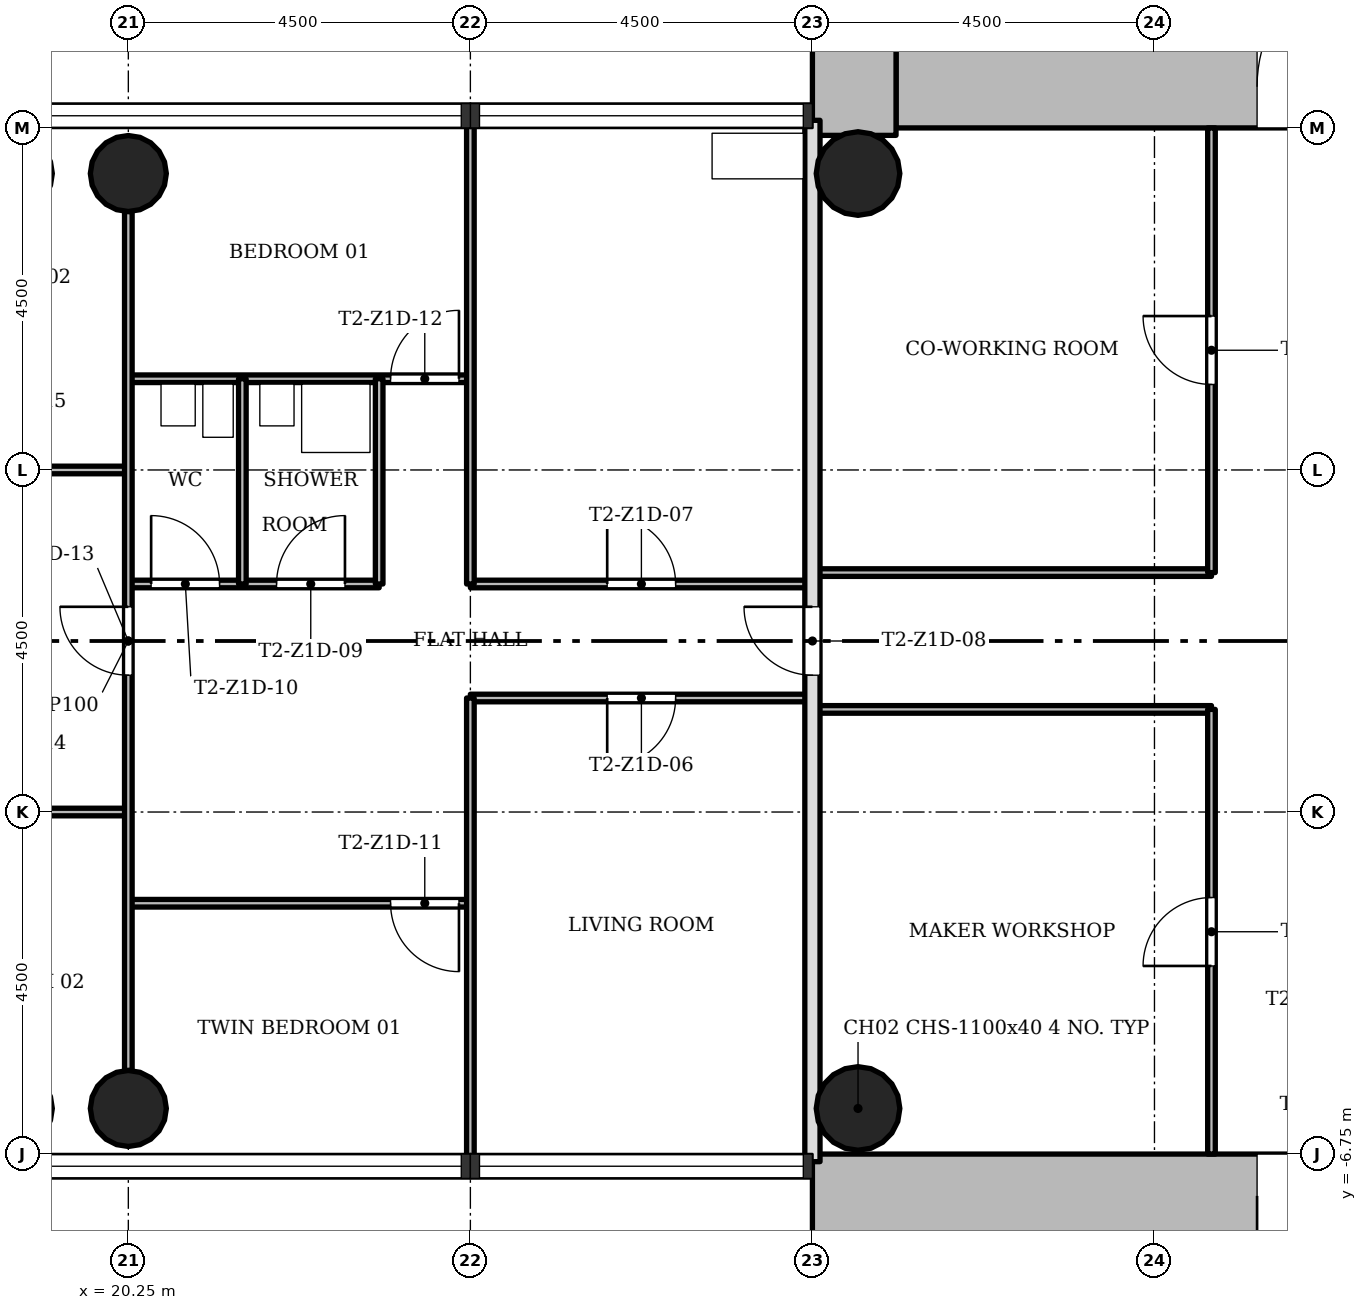
"""IFC4 building model, lengths in metres.
Left out: names, types, materials, properties, quantities, classifications, styles, units other than length and angle.
Written with IfcOpenShell. Run it as: python <this file> out.ifc"""

import sys

from ifc_helpers import new_model, si_unit, direction, frame, frame_2d, origin, origin_2d, place, context, subcontext, project, spatial, rectangle, hollow_circle, extrude, element, fill, save


model = new_model("IFC4")
c1 = context("Model", 3, precision=1e-05, world=origin(), true_north=direction((0.0, 1.0)))
c2 = subcontext(c1, "Body", "Model", "MODEL_VIEW")
j1 = project(units=[si_unit("LENGTHUNIT", "METRE"), si_unit("PLANEANGLEUNIT", "RADIAN")], contexts=[c1])
p1 = place(None, origin())
s1 = spatial("IfcSite", under=j1, at=p1, CompositionType="ELEMENT")
p2 = place(p1, origin())
s2 = spatial("IfcBuilding", under=s1, at=p2, CompositionType="ELEMENT")
p3 = place(p2, frame((0.0, 0.0, 61.9)))
s3 = spatial("IfcBuildingStorey", under=s2, at=p3, CompositionType="ELEMENT", Elevation=61.9)
p4 = place(p3, frame((30.35, 7.3, 0.0), z_axis=(0.0, 0.0, 1.0), x_axis=(1.0, 0.0, 0.0)))
e1 = element("IfcWall", 1, at=p4, inside=s3, PredefinedType="SHEAR", context=c2, shape_type="SweptSolid", body=[
    extrude(rectangle(XDim=12.4, YDim=1.1, at=frame_2d((6.2, 0.0))), origin(), (0.0, 0.0, 1.0), 3.4),
])
p5 = place(p4, frame((4.75, 0.0, 0.0)))
e2 = element("IfcOpeningElement", 2, at=p5, cuts=e1, PredefinedType="OPENING", context=c2, shape_type="SweptSolid", body=[
    extrude(rectangle(XDim=1.8, YDim=2.1, at=frame_2d((0.9, 1.05))), frame((0.0, 0.56, 0.0), z_axis=(0.0, -1.0, 0.0), x_axis=(1.0, 0.0, 0.0)), (0.0, 0.0, 1.0), 1.12),
])
p6 = place(p3, frame((29.8, 15.248, 0.0), z_axis=(0.0, 0.0, 1.0), x_axis=(0.0, -1.0, 0.0)))
e3 = element("IfcWall", 3, at=p6, inside=s3, PredefinedType="SHEAR", context=c2, shape_type="SweptSolid", body=[
    extrude(rectangle(XDim=8.596, YDim=1.1, at=frame_2d((4.298, 0.0))), origin(), (0.0, 0.0, 1.0), 3.4),
])
p7 = place(p3, frame((41.65, -7.3, 0.0), z_axis=(0.0, 0.0, 1.0), x_axis=(-1.0, 0.0, 0.0)))
e4 = element("IfcWall", 4, at=p7, inside=s3, PredefinedType="SHEAR", context=c2, shape_type="SweptSolid", body=[
    extrude(rectangle(XDim=12.4, YDim=1.1, at=frame_2d((6.2, 0.0))), origin(), (0.0, 0.0, 1.0), 3.4),
])
p8 = place(p7, frame((4.75, 0.0, 0.0)))
e5 = element("IfcOpeningElement", 5, at=p8, cuts=e4, PredefinedType="OPENING", context=c2, shape_type="SweptSolid", body=[
    extrude(rectangle(XDim=1.8, YDim=2.1, at=frame_2d((0.9, 1.05))), frame((0.0, 0.56, 0.0), z_axis=(0.0, -1.0, 0.0), x_axis=(1.0, 0.0, 0.0)), (0.0, 0.0, 1.0), 1.12),
])
for number, where, z_axis, x_axis in (
    (6, (20.25, 6.15, 0.0), (0.0, 0.0, 1.0), (1.0, 0.0, 0.0)),
    (7, (20.25, -6.15, 0.0), (0.0, 0.0, 1.0), (1.0, 0.0, 0.0)),
):
    element("IfcColumn", number, at=place(p3, frame(where, z_axis=z_axis, x_axis=x_axis)), inside=s3, PredefinedType="COLUMN", context=c2, shape_type="SweptSolid", body=[
        extrude(hollow_circle(Radius=0.5, WallThickness=0.036, at=origin_2d()), origin(), (0.0, 0.0, 1.0), 3.4),
    ])
for number, where, z_axis, x_axis in (
    (8, (29.85, 6.15, 0.0), (0.0, 0.0, 1.0), (1.0, 0.0, 0.0)),
    (9, (29.85, -6.15, 0.0), (0.0, 0.0, 1.0), (1.0, 0.0, 0.0)),
):
    element("IfcColumn", number, at=place(p3, frame(where, z_axis=z_axis, x_axis=x_axis)), inside=s3, PredefinedType="COLUMN", context=c2, shape_type="SweptSolid", body=[
        extrude(hollow_circle(Radius=0.55, WallThickness=0.04, at=origin_2d()), origin(), (0.0, 0.0, 1.0), 3.4),
    ])
p9 = place(p3, frame((24.75, -3.45, 0.0), z_axis=(0.0, 0.0, 1.0), x_axis=(-1.0, 0.0, 0.0)))
e10 = element("IfcWall", 10, at=p9, inside=s3, PredefinedType="PARTITIONING", context=c2, shape_type="SweptSolid", body=[
    extrude(rectangle(XDim=4.5, YDim=0.1, at=frame_2d((2.25, 0.0))), origin(), (0.0, 0.0, 1.0), 3.0),
])
p10 = place(p9, frame((0.15, 0.0, 0.0)))
e11 = element("IfcOpeningElement", 11, at=p10, cuts=e10, PredefinedType="OPENING", context=c2, shape_type="SweptSolid", body=[
    extrude(rectangle(XDim=0.9, YDim=2.1, at=frame_2d((0.45, 1.05))), frame((0.0, 0.06, 0.0), z_axis=(0.0, -1.0, 0.0), x_axis=(1.0, 0.0, 0.0)), (0.0, 0.0, 1.0), 0.12),
])
p11 = place(p3, frame((20.25, -2.25, 0.0), z_axis=(0.0, 0.0, 1.0), x_axis=(-1.0, 0.0, 0.0)))
e12 = element("IfcWall", 12, at=p11, inside=s3, PredefinedType="PARTITIONING", context=c2, shape_type="SweptSolid", body=[
    extrude(rectangle(XDim=4.6, YDim=0.1, at=frame_2d((2.3, 0.0))), origin(), (0.0, 0.0, 1.0), 3.0),
])
p12 = place(p11, frame((1.05, 0.0, 0.0)))
e13 = element("IfcOpeningElement", 13, at=p12, cuts=e12, PredefinedType="OPENING", context=c2, shape_type="SweptSolid", body=[
    extrude(rectangle(XDim=0.9, YDim=2.1, at=frame_2d((0.45, 1.05))), frame((0.0, 0.06, 0.0), z_axis=(0.0, -1.0, 0.0), x_axis=(1.0, 0.0, 0.0)), (0.0, 0.0, 1.0), 0.12),
])
p13 = place(p3, frame((34.5, -0.9, 0.0), z_axis=(0.0, 0.0, 1.0), x_axis=(-1.0, 0.0, 0.0)))
e14 = element("IfcWall", 14, at=p13, inside=s3, PredefinedType="PARTITIONING", context=c2, shape_type="SweptSolid", body=[
    extrude(rectangle(XDim=5.25, YDim=0.1, at=frame_2d((2.625, 0.0))), origin(), (0.0, 0.0, 1.0), 3.0),
])
p14 = place(p3, frame((29.25, -0.75, 0.0), z_axis=(0.0, 0.0, 1.0), x_axis=(-1.0, 0.0, 0.0)))
e15 = element("IfcWall", 15, at=p14, inside=s3, PredefinedType="PARTITIONING", context=c2, shape_type="SweptSolid", body=[
    extrude(rectangle(XDim=4.5, YDim=0.1, at=frame_2d((2.25, 0.0))), origin(), (0.0, 0.0, 1.0), 3.0),
])
p15 = place(p14, frame((1.8, 0.0, 0.0)))
e16 = element("IfcOpeningElement", 16, at=p15, cuts=e15, PredefinedType="OPENING", context=c2, shape_type="SweptSolid", body=[
    extrude(rectangle(XDim=0.9, YDim=2.1, at=frame_2d((0.45, 1.05))), frame((0.0, 0.06, 0.0), z_axis=(0.0, -1.0, 0.0), x_axis=(1.0, 0.0, 0.0)), (0.0, 0.0, 1.0), 0.12),
])
p16 = place(p3, frame((29.25, 0.75, 0.0), z_axis=(0.0, 0.0, 1.0), x_axis=(-1.0, 0.0, 0.0)))
e17 = element("IfcWall", 17, at=p16, inside=s3, PredefinedType="PARTITIONING", context=c2, shape_type="SweptSolid", body=[
    extrude(rectangle(XDim=4.5, YDim=0.1, at=frame_2d((2.25, 0.0))), origin(), (0.0, 0.0, 1.0), 3.0),
])
p17 = place(p16, frame((1.8, 0.0, 0.0)))
e18 = element("IfcOpeningElement", 18, at=p17, cuts=e17, PredefinedType="OPENING", context=c2, shape_type="SweptSolid", body=[
    extrude(rectangle(XDim=0.9, YDim=2.1, at=frame_2d((0.45, 1.05))), frame((0.0, 0.06, 0.0), z_axis=(0.0, -1.0, 0.0), x_axis=(1.0, 0.0, 0.0)), (0.0, 0.0, 1.0), 0.12),
])
p18 = place(p3, frame((23.55, 0.75, 0.0), z_axis=(0.0, 0.0, 1.0), x_axis=(-1.0, 0.0, 0.0)))
e19 = element("IfcWall", 19, at=p18, inside=s3, PredefinedType="PARTITIONING", context=c2, shape_type="SweptSolid", body=[
    extrude(rectangle(XDim=3.3, YDim=0.1, at=frame_2d((1.65, 0.0))), origin(), (0.0, 0.0, 1.0), 3.0),
])
p19 = place(p18, frame((0.45, 0.0, 0.0)))
e20 = element("IfcOpeningElement", 20, at=p19, cuts=e19, PredefinedType="OPENING", context=c2, shape_type="SweptSolid", body=[
    extrude(rectangle(XDim=0.9, YDim=2.1, at=frame_2d((0.45, 1.05))), frame((0.0, 0.06, 0.0), z_axis=(0.0, -1.0, 0.0), x_axis=(1.0, 0.0, 0.0)), (0.0, 0.0, 1.0), 0.12),
])
p20 = place(p18, frame((2.1, 0.0, 0.0)))
e21 = element("IfcOpeningElement", 21, at=p20, cuts=e19, PredefinedType="OPENING", context=c2, shape_type="SweptSolid", body=[
    extrude(rectangle(XDim=0.9, YDim=2.1, at=frame_2d((0.45, 1.05))), frame((0.0, 0.06, 0.0), z_axis=(0.0, -1.0, 0.0), x_axis=(1.0, 0.0, 0.0)), (0.0, 0.0, 1.0), 0.12),
])
p21 = place(p3, frame((34.5, 0.9, 0.0), z_axis=(0.0, 0.0, 1.0), x_axis=(-1.0, 0.0, 0.0)))
e22 = element("IfcWall", 22, at=p21, inside=s3, PredefinedType="PARTITIONING", context=c2, shape_type="SweptSolid", body=[
    extrude(rectangle(XDim=5.25, YDim=0.1, at=frame_2d((2.625, 0.0))), origin(), (0.0, 0.0, 1.0), 3.0),
])
p22 = place(p3, frame((20.25, 2.25, 0.0), z_axis=(0.0, 0.0, 1.0), x_axis=(-1.0, 0.0, 0.0)))
e23 = element("IfcWall", 23, at=p22, inside=s3, PredefinedType="PARTITIONING", context=c2, shape_type="SweptSolid", body=[
    extrude(rectangle(XDim=4.6, YDim=0.1, at=frame_2d((2.3, 0.0))), origin(), (0.0, 0.0, 1.0), 3.0),
])
p23 = place(p22, frame((1.05, 0.0, 0.0)))
e24 = element("IfcOpeningElement", 24, at=p23, cuts=e23, PredefinedType="OPENING", context=c2, shape_type="SweptSolid", body=[
    extrude(rectangle(XDim=0.9, YDim=2.1, at=frame_2d((0.45, 1.05))), frame((0.0, 0.06, 0.0), z_axis=(0.0, -1.0, 0.0), x_axis=(1.0, 0.0, 0.0)), (0.0, 0.0, 1.0), 0.12),
])
p24 = place(p3, frame((24.75, 3.45, 0.0), z_axis=(0.0, 0.0, 1.0), x_axis=(-1.0, 0.0, 0.0)))
e25 = element("IfcWall", 25, at=p24, inside=s3, PredefinedType="PARTITIONING", context=c2, shape_type="SweptSolid", body=[
    extrude(rectangle(XDim=4.5, YDim=0.1, at=frame_2d((2.25, 0.0))), origin(), (0.0, 0.0, 1.0), 3.0),
])
p25 = place(p24, frame((0.15, 0.0, 0.0)))
e26 = element("IfcOpeningElement", 26, at=p25, cuts=e25, PredefinedType="OPENING", context=c2, shape_type="SweptSolid", body=[
    extrude(rectangle(XDim=0.9, YDim=2.1, at=frame_2d((0.45, 1.05))), frame((0.0, 0.06, 0.0), z_axis=(0.0, -1.0, 0.0), x_axis=(1.0, 0.0, 0.0)), (0.0, 0.0, 1.0), 0.12),
])
p26 = place(p3, frame((34.5, -6.75, 0.0), z_axis=(0.0, 0.0, 1.0), x_axis=(0.0, 1.0, 0.0)))
e27 = element("IfcWall", 27, at=p26, inside=s3, PredefinedType="PARTITIONING", context=c2, shape_type="SweptSolid", body=[
    extrude(rectangle(XDim=5.85, YDim=0.1, at=frame_2d((2.925, 0.0))), origin(), (0.0, 0.0, 1.0), 3.0),
])
p27 = place(p26, frame((2.475, 0.0, 0.0)))
e28 = element("IfcOpeningElement", 28, at=p27, cuts=e27, PredefinedType="OPENING", context=c2, shape_type="SweptSolid", body=[
    extrude(rectangle(XDim=0.9, YDim=2.1, at=frame_2d((0.45, 1.05))), frame((0.0, 0.06, 0.0), z_axis=(0.0, -1.0, 0.0), x_axis=(1.0, 0.0, 0.0)), (0.0, 0.0, 1.0), 0.12),
])
p28 = place(p3, frame((34.5, 0.9, 0.0), z_axis=(0.0, 0.0, 1.0), x_axis=(0.0, 1.0, 0.0)))
e29 = element("IfcWall", 29, at=p28, inside=s3, PredefinedType="PARTITIONING", context=c2, shape_type="SweptSolid", body=[
    extrude(rectangle(XDim=5.85, YDim=0.1, at=frame_2d((2.925, 0.0))), origin(), (0.0, 0.0, 1.0), 3.0),
])
p29 = place(p28, frame((2.475, 0.0, 0.0)))
e30 = element("IfcOpeningElement", 30, at=p29, cuts=e29, PredefinedType="OPENING", context=c2, shape_type="SweptSolid", body=[
    extrude(rectangle(XDim=0.9, YDim=2.1, at=frame_2d((0.45, 1.05))), frame((0.0, 0.06, 0.0), z_axis=(0.0, -1.0, 0.0), x_axis=(1.0, 0.0, 0.0)), (0.0, 0.0, 1.0), 0.12),
])
p30 = place(p3, frame((29.25, -6.85, 0.0), z_axis=(0.0, 0.0, 1.0), x_axis=(0.0, 1.0, 0.0)))
e31 = element("IfcWall", 31, at=p30, inside=s3, PredefinedType="SOLIDWALL", context=c2, shape_type="SweptSolid", body=[
    extrude(rectangle(XDim=13.7, YDim=0.2, at=frame_2d((6.85, 0.0))), origin(), (0.0, 0.0, 1.0), 3.0),
])
p31 = place(p30, frame((6.4, 0.0, 0.0)))
e32 = element("IfcOpeningElement", 32, at=p31, cuts=e31, PredefinedType="OPENING", context=c2, shape_type="SweptSolid", body=[
    extrude(rectangle(XDim=0.9, YDim=2.1, at=frame_2d((0.45, 1.05))), frame((0.0, 0.11, 0.0), z_axis=(0.0, -1.0, 0.0), x_axis=(1.0, 0.0, 0.0)), (0.0, 0.0, 1.0), 0.22),
])
for number, where, z_axis, x_axis in (
    (33, (24.75, -6.85, 0.0), (0.0, 0.0, 1.0), (0.0, 1.0, 0.0)),
    (34, (24.75, 0.75, 0.0), (0.0, 0.0, 1.0), (0.0, 1.0, 0.0)),
):
    element("IfcWall", number, at=place(p3, frame(where, z_axis=z_axis, x_axis=x_axis)), inside=s3, PredefinedType="PARTITIONING", context=c2, shape_type="SweptSolid", body=[
        extrude(rectangle(XDim=6.1, YDim=0.1, at=frame_2d((3.05, 0.0))), origin(), (0.0, 0.0, 1.0), 3.0),
    ])
for number, where, z_axis, x_axis in (
    (35, (23.55, 0.75, 0.0), (0.0, 0.0, 1.0), (0.0, 1.0, 0.0)),
    (36, (21.75, 0.75, 0.0), (0.0, 0.0, 1.0), (0.0, 1.0, 0.0)),
):
    element("IfcWall", number, at=place(p3, frame(where, z_axis=z_axis, x_axis=x_axis)), inside=s3, PredefinedType="PARTITIONING", context=c2, shape_type="SweptSolid", body=[
        extrude(rectangle(XDim=2.7, YDim=0.1, at=frame_2d((1.35, 0.0))), origin(), (0.0, 0.0, 1.0), 3.0),
    ])
p32 = place(p3, frame((20.25, -5.65, 0.0), z_axis=(0.0, 0.0, 1.0), x_axis=(0.0, 1.0, 0.0)))
e37 = element("IfcWall", 37, at=p32, inside=s3, PredefinedType="PARTITIONING", context=c2, shape_type="SweptSolid", body=[
    extrude(rectangle(XDim=11.3, YDim=0.1, at=frame_2d((5.65, 0.0))), origin(), (0.0, 0.0, 1.0), 3.0),
])
p33 = place(p32, frame((5.2, 0.0, 0.0)))
e38 = element("IfcOpeningElement", 38, at=p33, cuts=e37, PredefinedType="OPENING", context=c2, shape_type="SweptSolid", body=[
    extrude(rectangle(XDim=0.9, YDim=2.1, at=frame_2d((0.45, 1.05))), frame((0.0, 0.06, 0.0), z_axis=(0.0, -1.0, 0.0), x_axis=(1.0, 0.0, 0.0)), (0.0, 0.0, 1.0), 0.12),
])
p34 = place(p29, origin())
e39 = element("IfcDoor", 39, at=p34, inside=s3, OperationType="SINGLE_SWING_LEFT", PredefinedType="DOOR", context=c2, shape_type="SweptSolid", body=[
    extrude(rectangle(XDim=0.9, YDim=2.1, at=frame_2d((0.45, 1.05))), frame((0.0, 0.025, 0.0), z_axis=(0.0, -1.0, 0.0), x_axis=(1.0, 0.0, 0.0)), (0.0, 0.0, 1.0), 0.05),
])
fill(e30, e39)
p35 = place(p27, origin())
e40 = element("IfcDoor", 40, at=p35, inside=s3, OperationType="SINGLE_SWING_RIGHT", PredefinedType="DOOR", context=c2, shape_type="SweptSolid", body=[
    extrude(rectangle(XDim=0.9, YDim=2.1, at=frame_2d((0.45, 1.05))), frame((0.0, 0.025, 0.0), z_axis=(0.0, -1.0, 0.0), x_axis=(1.0, 0.0, 0.0)), (0.0, 0.0, 1.0), 0.05),
])
fill(e28, e40)
p36 = place(p15, origin())
e41 = element("IfcDoor", 41, at=p36, inside=s3, OperationType="SINGLE_SWING_LEFT", PredefinedType="DOOR", context=c2, shape_type="SweptSolid", body=[
    extrude(rectangle(XDim=0.9, YDim=2.1, at=frame_2d((0.45, 1.05))), frame((0.0, 0.025, 0.0), z_axis=(0.0, -1.0, 0.0), x_axis=(1.0, 0.0, 0.0)), (0.0, 0.0, 1.0), 0.05),
])
fill(e16, e41)
p37 = place(p17, origin())
e42 = element("IfcDoor", 42, at=p37, inside=s3, OperationType="SINGLE_SWING_RIGHT", PredefinedType="DOOR", context=c2, shape_type="SweptSolid", body=[
    extrude(rectangle(XDim=0.9, YDim=2.1, at=frame_2d((0.45, 1.05))), frame((0.0, 0.025, 0.0), z_axis=(0.0, -1.0, 0.0), x_axis=(1.0, 0.0, 0.0)), (0.0, 0.0, 1.0), 0.05),
])
fill(e18, e42)
p38 = place(p31, origin())
e43 = element("IfcDoor", 43, at=p38, inside=s3, OperationType="SINGLE_SWING_LEFT", PredefinedType="DOOR", context=c2, shape_type="SweptSolid", body=[
    extrude(rectangle(XDim=0.9, YDim=2.1, at=frame_2d((0.45, 1.05))), frame((0.0, 0.025, 0.0), z_axis=(0.0, -1.0, 0.0), x_axis=(1.0, 0.0, 0.0)), (0.0, 0.0, 1.0), 0.05),
])
fill(e32, e43)
p39 = place(p19, origin())
e44 = element("IfcDoor", 44, at=p39, inside=s3, OperationType="SINGLE_SWING_LEFT", PredefinedType="DOOR", context=c2, shape_type="SweptSolid", body=[
    extrude(rectangle(XDim=0.9, YDim=2.1, at=frame_2d((0.45, 1.05))), frame((0.0, 0.025, 0.0), z_axis=(0.0, -1.0, 0.0), x_axis=(1.0, 0.0, 0.0)), (0.0, 0.0, 1.0), 0.05),
])
fill(e20, e44)
p40 = place(p20, origin())
e45 = element("IfcDoor", 45, at=p40, inside=s3, OperationType="SINGLE_SWING_RIGHT", PredefinedType="DOOR", context=c2, shape_type="SweptSolid", body=[
    extrude(rectangle(XDim=0.9, YDim=2.1, at=frame_2d((0.45, 1.05))), frame((0.0, 0.025, 0.0), z_axis=(0.0, -1.0, 0.0), x_axis=(1.0, 0.0, 0.0)), (0.0, 0.0, 1.0), 0.05),
])
fill(e21, e45)
p41 = place(p10, origin())
e46 = element("IfcDoor", 46, at=p41, inside=s3, OperationType="SINGLE_SWING_RIGHT", PredefinedType="DOOR", context=c2, shape_type="SweptSolid", body=[
    extrude(rectangle(XDim=0.9, YDim=2.1, at=frame_2d((0.45, 1.05))), frame((0.0, 0.025, 0.0), z_axis=(0.0, -1.0, 0.0), x_axis=(1.0, 0.0, 0.0)), (0.0, 0.0, 1.0), 0.05),
])
fill(e11, e46)
p42 = place(p25, origin())
e47 = element("IfcDoor", 47, at=p42, inside=s3, OperationType="SINGLE_SWING_LEFT", PredefinedType="DOOR", context=c2, shape_type="SweptSolid", body=[
    extrude(rectangle(XDim=0.9, YDim=2.1, at=frame_2d((0.45, 1.05))), frame((0.0, 0.025, 0.0), z_axis=(0.0, -1.0, 0.0), x_axis=(1.0, 0.0, 0.0)), (0.0, 0.0, 1.0), 0.05),
])
fill(e26, e47)
p43 = place(p33, origin())
e48 = element("IfcDoor", 48, at=p43, inside=s3, OperationType="SINGLE_SWING_LEFT", PredefinedType="DOOR", context=c2, shape_type="SweptSolid", body=[
    extrude(rectangle(XDim=0.9, YDim=2.1, at=frame_2d((0.45, 1.05))), frame((0.0, 0.025, 0.0), z_axis=(0.0, -1.0, 0.0), x_axis=(1.0, 0.0, 0.0)), (0.0, 0.0, 1.0), 0.05),
])
fill(e38, e48)
p44 = place(p5, origin())
e49 = element("IfcDoor", 49, at=p44, inside=s3, OperationType="SINGLE_SWING_LEFT", PredefinedType="DOOR", context=c2, shape_type="SweptSolid", body=[
    extrude(rectangle(XDim=1.8, YDim=2.1, at=frame_2d((0.9, 1.05))), frame((0.0, 0.025, 0.0), z_axis=(0.0, -1.0, 0.0), x_axis=(1.0, 0.0, 0.0)), (0.0, 0.0, 1.0), 0.05),
])
fill(e2, e49)
p45 = place(p8, origin())
e50 = element("IfcDoor", 50, at=p45, inside=s3, OperationType="SINGLE_SWING_LEFT", PredefinedType="DOOR", context=c2, shape_type="SweptSolid", body=[
    extrude(rectangle(XDim=1.8, YDim=2.1, at=frame_2d((0.9, 1.05))), frame((0.0, 0.025, 0.0), z_axis=(0.0, -1.0, 0.0), x_axis=(1.0, 0.0, 0.0)), (0.0, 0.0, 1.0), 0.05),
])
fill(e5, e50)
save(model, sys.argv[1])
